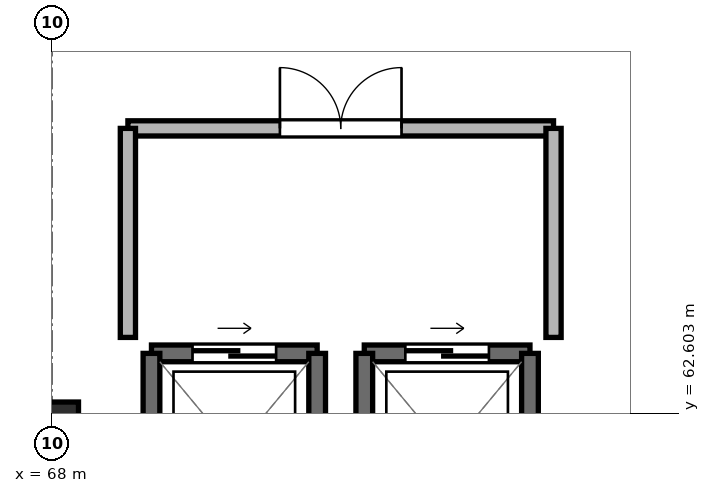
"""IFC4 building model, lengths in metres.
Left out: names, types, materials, properties, quantities, classifications, styles, units other than length and angle.
Written with IfcOpenShell. Run it as: python <this file> out.ifc"""

import sys

from ifc_helpers import new_model, si_unit, direction, frame, frame_2d, origin, origin_2d, place, context, subcontext, project, spatial, rectangle, extrude, element, fill, save


model = new_model("IFC4")
c1 = context("Model", 3, precision=1e-05, world=origin(), true_north=direction((0.0, 1.0)))
c2 = subcontext(c1, "Body", "Model", "MODEL_VIEW")
j1 = project(units=[si_unit("LENGTHUNIT", "METRE"), si_unit("PLANEANGLEUNIT", "RADIAN")], contexts=[c1])
p1 = place(None, origin())
s1 = spatial("IfcSite", under=j1, at=p1, CompositionType="ELEMENT")
p2 = place(p1, origin())
s2 = spatial("IfcBuilding", under=s1, at=p2, CompositionType="ELEMENT")
p3 = place(p2, frame((0.0, 0.0, 56.8)))
s3 = spatial("IfcBuildingStorey", under=s2, at=p3, CompositionType="ELEMENT", Elevation=56.8)
p4 = place(p3, frame((68.0, 62.4, -0.22), z_axis=(0.0, 0.0, 1.0), x_axis=(1.0, 0.0, 0.0)))
e1 = element("IfcColumn", 1, at=p4, inside=s3, PredefinedType="COLUMN", context=c2, shape_type="SweptSolid", body=[
    extrude(rectangle(XDim=0.7, YDim=0.7, at=origin_2d()), origin(), (0.0, 0.0, 1.0), 3.26),
])
p5 = place(p3, frame((71.49, 63.39, 0.0), z_axis=(0.0, 0.0, 1.0), x_axis=(-1.0, 0.0, 0.0)))
e2 = element("IfcWall", 2, at=p5, inside=s3, PredefinedType="SHEAR", context=c2, shape_type="SweptSolid", body=[
    extrude(rectangle(XDim=2.18, YDim=0.22, at=frame_2d((1.09, 0.0))), origin(), (0.0, 0.0, 1.0), 3.04),
])
p6 = place(p5, frame((0.54, 0.0, 0.0)))
e3 = element("IfcOpeningElement", 3, at=p6, cuts=e2, PredefinedType="OPENING", context=c2, shape_type="SweptSolid", body=[
    extrude(rectangle(XDim=1.1, YDim=2.2, at=frame_2d((0.55, 1.1))), frame((0.0, 0.122, 0.0), z_axis=(0.0, -1.0, 0.0), x_axis=(1.0, 0.0, 0.0)), (0.0, 0.0, 1.0), 0.244),
])
for number, where, z_axis, x_axis in (
    (4, (69.31, 63.39, 0.0), (0.0, 0.0, 1.0), (0.0, -1.0, 0.0)),
    (5, (71.49, 60.81, 0.0), (0.0, 0.0, 1.0), (0.0, 1.0, 0.0)),
):
    element("IfcWall", number, at=place(p3, frame(where, z_axis=z_axis, x_axis=x_axis)), inside=s3, PredefinedType="SHEAR", context=c2, shape_type="SweptSolid", body=[
        extrude(rectangle(XDim=2.58, YDim=0.22, at=frame_2d((1.29, 0.0))), origin(), (0.0, 0.0, 1.0), 3.04),
    ])
p7 = place(p3, frame((74.29, 63.39, 0.0), z_axis=(0.0, 0.0, 1.0), x_axis=(-1.0, 0.0, 0.0)))
e6 = element("IfcWall", 6, at=p7, inside=s3, PredefinedType="SHEAR", context=c2, shape_type="SweptSolid", body=[
    extrude(rectangle(XDim=2.18, YDim=0.22, at=frame_2d((1.09, 0.0))), origin(), (0.0, 0.0, 1.0), 3.04),
])
p8 = place(p7, frame((0.54, 0.0, 0.0)))
e7 = element("IfcOpeningElement", 7, at=p8, cuts=e6, PredefinedType="OPENING", context=c2, shape_type="SweptSolid", body=[
    extrude(rectangle(XDim=1.1, YDim=2.2, at=frame_2d((0.55, 1.1))), frame((0.0, 0.122, 0.0), z_axis=(0.0, -1.0, 0.0), x_axis=(1.0, 0.0, 0.0)), (0.0, 0.0, 1.0), 0.244),
])
for number, where, z_axis, x_axis in (
    (8, (72.11, 63.39, 0.0), (0.0, 0.0, 1.0), (0.0, -1.0, 0.0)),
    (9, (74.29, 60.81, 0.0), (0.0, 0.0, 1.0), (0.0, 1.0, 0.0)),
):
    element("IfcWall", number, at=place(p3, frame(where, z_axis=z_axis, x_axis=x_axis)), inside=s3, PredefinedType="SHEAR", context=c2, shape_type="SweptSolid", body=[
        extrude(rectangle(XDim=2.58, YDim=0.22, at=frame_2d((1.29, 0.0))), origin(), (0.0, 0.0, 1.0), 3.04),
    ])
p9 = place(p3, frame((69.0, 66.35, 0.0), z_axis=(0.0, 0.0, 1.0), x_axis=(1.0, 0.0, 0.0)))
e10 = element("IfcWall", 10, at=p9, inside=s3, PredefinedType="PARTITIONING", context=c2, shape_type="SweptSolid", body=[
    extrude(rectangle(XDim=5.6, YDim=0.2, at=frame_2d((2.8, 0.0))), origin(), (0.0, 0.0, 1.0), 2.53),
])
p10 = place(p9, frame((2.0, 0.0, 0.0)))
e11 = element("IfcOpeningElement", 11, at=p10, cuts=e10, PredefinedType="OPENING", context=c2, shape_type="SweptSolid", body=[
    extrude(rectangle(XDim=1.6, YDim=2.2, at=frame_2d((0.8, 1.1))), frame((0.0, 0.112, 0.0), z_axis=(0.0, -1.0, 0.0), x_axis=(1.0, 0.0, 0.0)), (0.0, 0.0, 1.0), 0.224),
])
for number, where, z_axis, x_axis in (
    (12, (69.0, 63.6, 0.0), (0.0, 0.0, 1.0), (0.0, 1.0, 0.0)),
    (13, (74.6, 63.6, 0.0), (0.0, 0.0, 1.0), (0.0, 1.0, 0.0)),
):
    element("IfcWall", number, at=place(p3, frame(where, z_axis=z_axis, x_axis=x_axis)), inside=s3, PredefinedType="PARTITIONING", context=c2, shape_type="SweptSolid", body=[
        extrude(rectangle(XDim=2.75, YDim=0.2, at=frame_2d((1.375, 0.0))), origin(), (0.0, 0.0, 1.0), 2.53),
    ])
p11 = place(p6, origin())
e14 = element("IfcDoor", 14, at=p11, inside=s3, OperationType="SLIDING_TO_LEFT", PredefinedType="DOOR", context=c2, shape_type="SweptSolid", body=[
    extrude(rectangle(XDim=1.1, YDim=2.2, at=frame_2d((0.55, 1.1))), frame((0.0, 0.025, 0.0), z_axis=(0.0, -1.0, 0.0), x_axis=(1.0, 0.0, 0.0)), (0.0, 0.0, 1.0), 0.05),
])
fill(e3, e14)
p12 = place(p8, origin())
e15 = element("IfcDoor", 15, at=p12, inside=s3, OperationType="SLIDING_TO_LEFT", PredefinedType="DOOR", context=c2, shape_type="SweptSolid", body=[
    extrude(rectangle(XDim=1.1, YDim=2.2, at=frame_2d((0.55, 1.1))), frame((0.0, 0.025, 0.0), z_axis=(0.0, -1.0, 0.0), x_axis=(1.0, 0.0, 0.0)), (0.0, 0.0, 1.0), 0.05),
])
fill(e7, e15)
p13 = place(p10, origin())
e16 = element("IfcDoor", 16, at=p13, inside=s3, OperationType="DOUBLE_DOOR_SINGLE_SWING", PredefinedType="DOOR", context=c2, shape_type="SweptSolid", body=[
    extrude(rectangle(XDim=1.6, YDim=2.2, at=frame_2d((0.8, 1.1))), frame((0.0, 0.025, 0.0), z_axis=(0.0, -1.0, 0.0), x_axis=(1.0, 0.0, 0.0)), (0.0, 0.0, 1.0), 0.05),
])
fill(e11, e16)
save(model, sys.argv[1])
